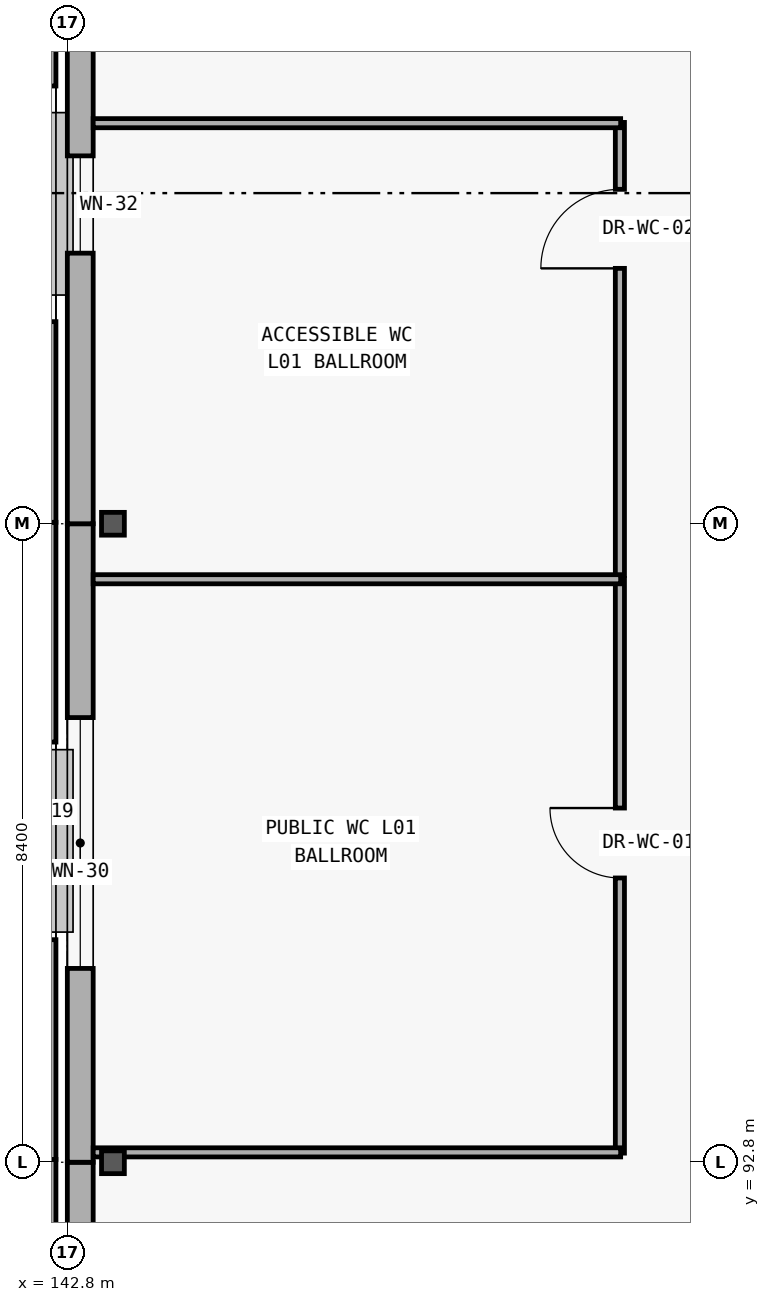
"""IFC4 building model, lengths in metres.
Left out: names, types, materials, properties, quantities, classifications, styles, units other than length and angle.
Written with IfcOpenShell. Run it as: python <this file> out.ifc"""

import sys

from ifc_helpers import new_model, si_unit, direction, frame, frame_2d, origin, origin_2d, place, context, subcontext, project, spatial, rectangle, i_section, extrude, element, fill, save


model = new_model("IFC4")
c1 = context("Model", 3, precision=1e-05, world=origin(), true_north=direction((0.0, 1.0)))
c2 = subcontext(c1, "Body", "Model", "MODEL_VIEW")
j1 = project(units=[si_unit("LENGTHUNIT", "METRE"), si_unit("PLANEANGLEUNIT", "RADIAN")], contexts=[c1])
p1 = place(None, origin())
s1 = spatial("IfcSite", under=j1, at=p1, CompositionType="ELEMENT")
p2 = place(p1, origin())
s2 = spatial("IfcBuilding", under=s1, at=p2, CompositionType="ELEMENT")
p3 = place(p2, frame((0.0, 0.0, 5.4)))
s3 = spatial("IfcBuildingStorey", under=s2, at=p3, CompositionType="ELEMENT", Elevation=5.4)
for number, where, z_axis, x_axis in (
    (1, (143.4, 92.8, 0.0), (0.0, 0.0, 1.0), (1.0, 0.0, 0.0)),
    (2, (143.4, 101.2, 0.0), (0.0, 0.0, 1.0), (1.0, 0.0, 0.0)),
):
    element("IfcColumn", number, at=place(p3, frame(where, z_axis=z_axis, x_axis=x_axis)), inside=s3, PredefinedType="COLUMN", context=c2, shape_type="SweptSolid", body=[
        extrude(i_section(OverallWidth=0.3, OverallDepth=0.3, WebThickness=0.011, FlangeThickness=0.019, at=origin_2d()), origin(), (0.0, 0.0, 1.0), 5.4),
    ])
p4 = place(p3, frame((142.97, 84.4, 0.0), z_axis=(0.0, 0.0, 1.0), x_axis=(0.0, 1.0, 0.0)))
e3 = element("IfcWall", 3, at=p4, inside=s3, PredefinedType="SOLIDWALL", context=c2, shape_type="SweptSolid", body=[
    extrude(rectangle(XDim=8.4, YDim=0.34, at=frame_2d((4.2, 0.0))), origin(), (0.0, 0.0, 1.0), 5.08),
])
p5 = place(p4, frame((3.05, 0.0, 0.9)))
e4 = element("IfcOpeningElement", 4, at=p5, cuts=e3, PredefinedType="OPENING", context=c2, shape_type="SweptSolid", body=[
    extrude(rectangle(XDim=2.3, YDim=2.05, at=frame_2d((1.15, 1.025))), frame((0.0, 0.18, 0.0), z_axis=(0.0, -1.0, 0.0), x_axis=(1.0, 0.0, 0.0)), (0.0, 0.0, 1.0), 0.36),
])
p6 = place(p3, frame((142.97, 92.8, 0.0), z_axis=(0.0, 0.0, 1.0), x_axis=(0.0, 1.0, 0.0)))
e5 = element("IfcWall", 5, at=p6, inside=s3, PredefinedType="SOLIDWALL", context=c2, shape_type="SweptSolid", body=[
    extrude(rectangle(XDim=8.4, YDim=0.34, at=frame_2d((4.2, 0.0))), origin(), (0.0, 0.0, 1.0), 5.08),
])
p7 = place(p6, frame((2.55, 0.0, 0.9)))
e6 = element("IfcOpeningElement", 6, at=p7, cuts=e5, PredefinedType="OPENING", context=c2, shape_type="SweptSolid", body=[
    extrude(rectangle(XDim=3.3, YDim=2.15, at=frame_2d((1.65, 1.075))), frame((0.0, 0.18, 0.0), z_axis=(0.0, -1.0, 0.0), x_axis=(1.0, 0.0, 0.0)), (0.0, 0.0, 1.0), 0.36),
])
p8 = place(p3, frame((142.97, 101.2, 0.0), z_axis=(0.0, 0.0, 1.0), x_axis=(0.0, 1.0, 0.0)))
e7 = element("IfcWall", 7, at=p8, inside=s3, PredefinedType="SOLIDWALL", context=c2, shape_type="SweptSolid", body=[
    extrude(rectangle(XDim=8.4, YDim=0.34, at=frame_2d((4.2, 0.0))), origin(), (0.0, 0.0, 1.0), 5.08),
])
p9 = place(p8, frame((3.56, 0.0, 0.9)))
e8 = element("IfcOpeningElement", 8, at=p9, cuts=e7, PredefinedType="OPENING", context=c2, shape_type="SweptSolid", body=[
    extrude(rectangle(XDim=1.28, YDim=1.6, at=frame_2d((0.64, 0.8))), frame((0.0, 0.18, 0.0), z_axis=(0.0, -1.0, 0.0), x_axis=(1.0, 0.0, 0.0)), (0.0, 0.0, 1.0), 0.36),
])
p10 = place(p3, frame((142.5, 92.837, 0.0), z_axis=(0.0, 0.0, 1.0), x_axis=(0.0, -1.0, 0.0)))
e9 = element("IfcWall", 9, at=p10, inside=s3, PredefinedType="SOLIDWALL", context=c2, shape_type="SweptSolid", body=[
    extrude(rectangle(XDim=8.381, YDim=0.3, at=frame_2d((4.19, 0.0))), origin(), (0.0, 0.0, 1.0), 5.1),
])
p11 = place(p10, frame((3.091, 0.0, 0.9)))
e10 = element("IfcOpeningElement", 10, at=p11, cuts=e9, PredefinedType="OPENING", context=c2, shape_type="SweptSolid", body=[
    extrude(rectangle(XDim=2.2, YDim=1.65, at=frame_2d((1.1, 0.825))), frame((0.0, 0.16, 0.0), z_axis=(0.0, -1.0, 0.0), x_axis=(1.0, 0.0, 0.0)), (0.0, 0.0, 1.0), 0.32),
])
p12 = place(p3, frame((142.5, 101.219, 0.0), z_axis=(0.0, 0.0, 1.0), x_axis=(0.0, -1.0, 0.0)))
e11 = element("IfcWall", 11, at=p12, inside=s3, PredefinedType="SOLIDWALL", context=c2, shape_type="SweptSolid", body=[
    extrude(rectangle(XDim=8.382, YDim=0.3, at=frame_2d((4.191, 0.0))), origin(), (0.0, 0.0, 1.0), 5.1),
])
p13 = place(p12, frame((2.891, 0.0, 0.9)))
e12 = element("IfcOpeningElement", 12, at=p13, cuts=e11, PredefinedType="OPENING", context=c2, shape_type="SweptSolid", body=[
    extrude(rectangle(XDim=2.6, YDim=2.2, at=frame_2d((1.3, 1.1))), frame((0.0, 0.16, 0.0), z_axis=(0.0, -1.0, 0.0), x_axis=(1.0, 0.0, 0.0)), (0.0, 0.0, 1.0), 0.32),
])
p14 = place(p3, frame((142.5, 109.6, 0.0), z_axis=(0.0, 0.0, 1.0), x_axis=(0.0, -1.0, 0.0)))
e13 = element("IfcWall", 13, at=p14, inside=s3, PredefinedType="SOLIDWALL", context=c2, shape_type="SweptSolid", body=[
    extrude(rectangle(XDim=8.381, YDim=0.3, at=frame_2d((4.19, 0.0))), origin(), (0.0, 0.0, 1.0), 5.1),
])
p15 = place(p14, frame((2.641, 0.0, 0.9)))
e14 = element("IfcOpeningElement", 14, at=p15, cuts=e13, PredefinedType="OPENING", context=c2, shape_type="SweptSolid", body=[
    extrude(rectangle(XDim=3.1, YDim=2.2, at=frame_2d((1.55, 1.1))), frame((0.0, 0.16, 0.0), z_axis=(0.0, -1.0, 0.0), x_axis=(1.0, 0.0, 0.0)), (0.0, 0.0, 1.0), 0.32),
])
p16 = place(p3, frame((150.07, 92.92, 0.0), z_axis=(0.0, 0.0, 1.0), x_axis=(0.0, 1.0, 0.0)))
e15 = element("IfcWall", 15, at=p16, inside=s3, PredefinedType="PARTITIONING", context=c2, shape_type="SweptSolid", body=[
    extrude(rectangle(XDim=7.56, YDim=0.12, at=frame_2d((3.78, 0.0))), origin(), (0.0, 0.0, 1.0), 4.18),
])
p17 = place(p16, frame((3.62, 0.0, 0.0)))
e16 = element("IfcOpeningElement", 16, at=p17, cuts=e15, PredefinedType="OPENING", context=c2, shape_type="SweptSolid", body=[
    extrude(rectangle(XDim=0.92, YDim=2.15, at=frame_2d((0.46, 1.075))), frame((0.0, 0.07, 0.0), z_axis=(0.0, -1.0, 0.0), x_axis=(1.0, 0.0, 0.0)), (0.0, 0.0, 1.0), 0.14),
])
p18 = place(p3, frame((150.07, 100.52, 0.0), z_axis=(0.0, 0.0, 1.0), x_axis=(0.0, 1.0, 0.0)))
e17 = element("IfcWall", 17, at=p18, inside=s3, PredefinedType="PARTITIONING", context=c2, shape_type="SweptSolid", body=[
    extrude(rectangle(XDim=5.96, YDim=0.12, at=frame_2d((2.98, 0.0))), origin(), (0.0, 0.0, 1.0), 4.18),
])
p19 = place(p18, frame((4.04, 0.0, 0.0)))
e18 = element("IfcOpeningElement", 18, at=p19, cuts=e17, PredefinedType="OPENING", context=c2, shape_type="SweptSolid", body=[
    extrude(rectangle(XDim=1.04, YDim=2.15, at=frame_2d((0.52, 1.075))), frame((0.0, 0.07, 0.0), z_axis=(0.0, -1.0, 0.0), x_axis=(1.0, 0.0, 0.0)), (0.0, 0.0, 1.0), 0.14),
])
for number, where, z_axis, x_axis in (
    (19, (143.14, 92.93, 0.0), (0.0, 0.0, 1.0), (1.0, 0.0, 0.0)),
    (20, (143.14, 100.47, 0.0), (0.0, 0.0, 1.0), (1.0, 0.0, 0.0)),
    (21, (143.14, 106.47, 0.0), (0.0, 0.0, 1.0), (1.0, 0.0, 0.0)),
):
    element("IfcWall", number, at=place(p3, frame(where, z_axis=z_axis, x_axis=x_axis)), inside=s3, PredefinedType="PARTITIONING", context=c2, shape_type="SweptSolid", body=[
        extrude(rectangle(XDim=6.94, YDim=0.12, at=frame_2d((3.47, 0.0))), origin(), (0.0, 0.0, 1.0), 4.18),
    ])
p20 = place(p7, origin())
e22 = element("IfcWindow", 22, at=p20, inside=s3, PartitioningType="SINGLE_PANEL", PredefinedType="WINDOW", context=c2, shape_type="SweptSolid", body=[
    extrude(rectangle(XDim=3.3, YDim=2.15, at=frame_2d((1.65, 1.075))), frame((0.0, 0.03, 0.0), z_axis=(0.0, -1.0, 0.0), x_axis=(1.0, 0.0, 0.0)), (0.0, 0.0, 1.0), 0.06),
])
fill(e6, e22)
p21 = place(p9, origin())
e23 = element("IfcWindow", 23, at=p21, inside=s3, PartitioningType="SINGLE_PANEL", PredefinedType="WINDOW", context=c2, shape_type="SweptSolid", body=[
    extrude(rectangle(XDim=1.28, YDim=1.6, at=frame_2d((0.64, 0.8))), frame((0.0, 0.03, 0.0), z_axis=(0.0, -1.0, 0.0), x_axis=(1.0, 0.0, 0.0)), (0.0, 0.0, 1.0), 0.06),
])
fill(e8, e23)
p22 = place(p17, origin())
e24 = element("IfcDoor", 24, at=p22, inside=s3, OperationType="SINGLE_SWING_RIGHT", PredefinedType="DOOR", context=c2, shape_type="SweptSolid", body=[
    extrude(rectangle(XDim=0.92, YDim=2.15, at=frame_2d((0.46, 1.075))), frame((0.0, 0.025, 0.0), z_axis=(0.0, -1.0, 0.0), x_axis=(1.0, 0.0, 0.0)), (0.0, 0.0, 1.0), 0.05),
])
fill(e16, e24)
p23 = place(p19, origin())
e25 = element("IfcDoor", 25, at=p23, inside=s3, OperationType="SINGLE_SWING_LEFT", PredefinedType="DOOR", context=c2, shape_type="SweptSolid", body=[
    extrude(rectangle(XDim=1.04, YDim=2.15, at=frame_2d((0.52, 1.075))), frame((0.0, 0.025, 0.0), z_axis=(0.0, -1.0, 0.0), x_axis=(1.0, 0.0, 0.0)), (0.0, 0.0, 1.0), 0.05),
])
fill(e18, e25)
save(model, sys.argv[1])
